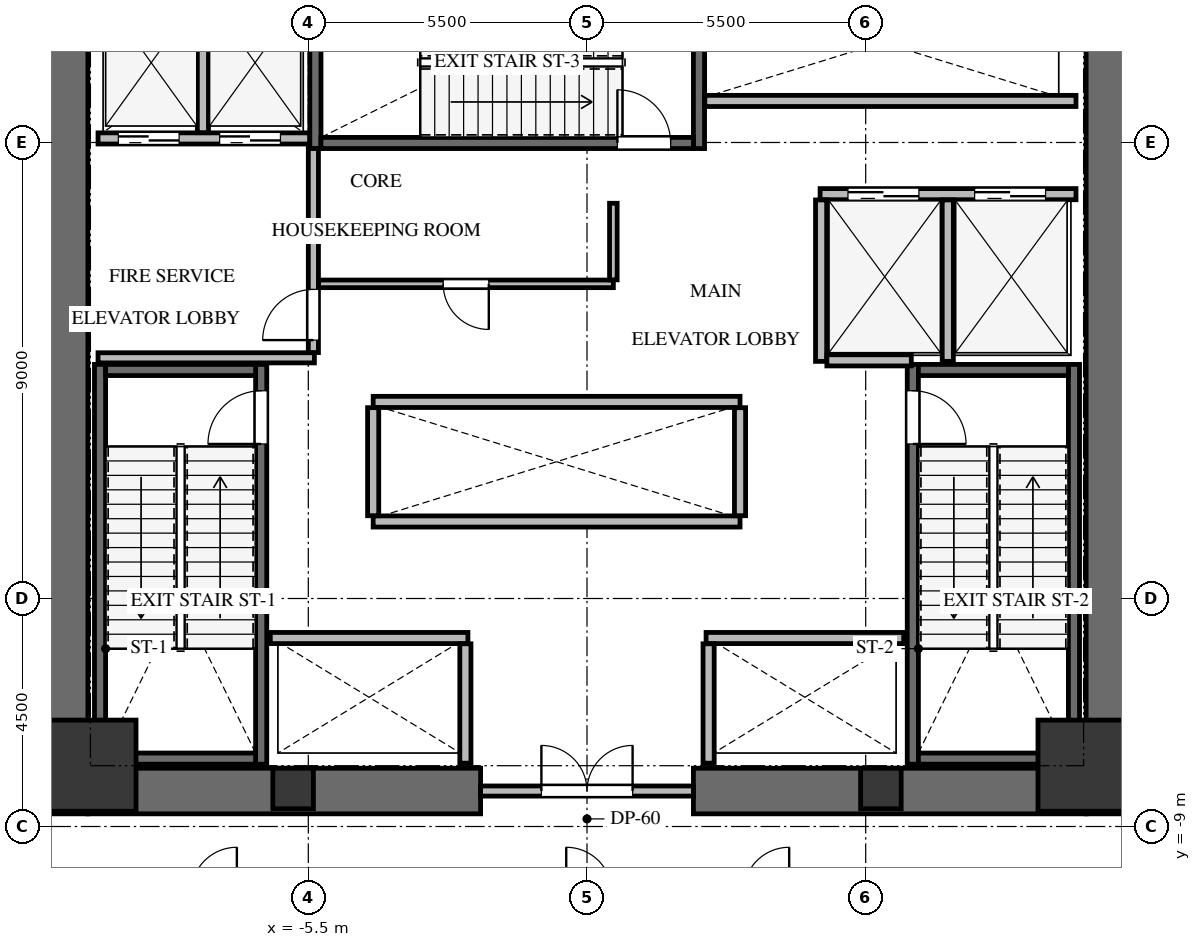
"""IFC4 building model, lengths in metres.
Left out: names, types, materials, properties, quantities, classifications, styles, units other than length and angle.
Written with IfcOpenShell. Run it as: python <this file> out.ifc"""

import sys

from ifc_helpers import new_model, si_unit, direction, frame, frame_2d, origin, origin_2d, place, context, subcontext, project, spatial, rectangle, extrude, source, transform, mapped, element, fill, save


model = new_model("IFC4")
c1 = context("Model", 3, precision=1e-05, world=origin(), true_north=direction((0.0, 1.0)))
c2 = subcontext(c1, "Body", "Model", "MODEL_VIEW")
j1 = project(units=[si_unit("LENGTHUNIT", "METRE"), si_unit("PLANEANGLEUNIT", "RADIAN")], contexts=[c1])
p1 = place(None, origin())
s1 = spatial("IfcSite", under=j1, at=p1, CompositionType="ELEMENT")
p2 = place(p1, origin())
s2 = spatial("IfcBuilding", under=s1, at=p2, CompositionType="ELEMENT")
p3 = place(p2, frame((0.0, 0.0, 10.4)))
s3 = spatial("IfcBuildingStorey", under=s2, at=p3, CompositionType="ELEMENT", Elevation=10.4)
for number, where, z_axis, x_axis in (
    (1, (-10.3, -8.75, 0.0), (0.0, 0.0, 1.0), (0.0, 1.0, 0.0)),
    (2, (10.3, -8.75, 0.0), (0.0, 0.0, 1.0), (0.0, 1.0, 0.0)),
):
    element("IfcWall", number, at=place(p3, frame(where, z_axis=z_axis, x_axis=x_axis)), inside=s3, PredefinedType="SHEAR", context=c2, shape_type="SweptSolid", body=[
        extrude(rectangle(XDim=17.5, YDim=0.9, at=frame_2d((8.75, 0.0))), origin(), (0.0, 0.0, 1.0), 5.2),
    ])
for number, where, z_axis, x_axis in (
    (3, (-9.85, -8.3, 0.0), (0.0, 0.0, 1.0), (1.0, 0.0, 0.0)),
    (4, (2.1, -8.3, 0.0), (0.0, 0.0, 1.0), (1.0, 0.0, 0.0)),
):
    element("IfcWall", number, at=place(p3, frame(where, z_axis=z_axis, x_axis=x_axis)), inside=s3, PredefinedType="SHEAR", context=c2, shape_type="SweptSolid", body=[
        extrude(rectangle(XDim=7.75, YDim=0.9, at=frame_2d((3.875, 0.0))), origin(), (0.0, 0.0, 1.0), 5.2),
    ])
p4 = place(p3, frame((-6.43, -7.77, -0.35), z_axis=(0.0, 0.0, 1.0), x_axis=(0.0, 1.0, 0.0)))
e5 = element("IfcWall", 5, at=p4, inside=s3, PredefinedType="SHEAR", context=c2, shape_type="SweptSolid", body=[
    extrude(rectangle(XDim=7.89, YDim=0.22, at=frame_2d((3.945, 0.0))), origin(), (0.0, 0.0, 1.0), 5.23),
])
p5 = place(p4, frame((6.32, 0.0, 0.0)))
e6 = element("IfcOpeningElement", 6, at=p5, cuts=e5, PredefinedType="OPENING", context=c2, shape_type="SweptSolid", body=[
    extrude(rectangle(XDim=1.05, YDim=2.15, at=frame_2d((0.525, 1.075))), frame((0.0, 0.12, 0.0), z_axis=(0.0, -1.0, 0.0), x_axis=(1.0, 0.0, 0.0)), (0.0, 0.0, 1.0), 0.24),
])
p6 = place(p3, frame((-9.61, 0.12, -0.35), z_axis=(0.0, 0.0, 1.0), x_axis=(0.0, -1.0, 0.0)))
e7 = element("IfcWall", 7, at=p6, inside=s3, PredefinedType="SHEAR", context=c2, shape_type="SweptSolid", body=[
    extrude(rectangle(XDim=7.89, YDim=0.22, at=frame_2d((3.945, 0.0))), origin(), (0.0, 0.0, 1.0), 5.23),
])
for number, where, z_axis, x_axis in (
    (8, (-9.5, -7.66, -0.35), (0.0, 0.0, 1.0), (1.0, 0.0, 0.0)),
    (9, (-6.54, 0.01, -0.35), (0.0, 0.0, 1.0), (-1.0, 0.0, 0.0)),
):
    element("IfcWall", number, at=place(p3, frame(where, z_axis=z_axis, x_axis=x_axis)), inside=s3, PredefinedType="SHEAR", context=c2, shape_type="SweptSolid", body=[
        extrude(rectangle(XDim=2.96, YDim=0.22, at=frame_2d((1.48, 0.0))), origin(), (0.0, 0.0, 1.0), 5.23),
    ])
p7 = place(p3, frame((9.61, -7.77, -0.35), z_axis=(0.0, 0.0, 1.0), x_axis=(0.0, 1.0, 0.0)))
e10 = element("IfcWall", 10, at=p7, inside=s3, PredefinedType="SHEAR", context=c2, shape_type="SweptSolid", body=[
    extrude(rectangle(XDim=7.89, YDim=0.22, at=frame_2d((3.945, 0.0))), origin(), (0.0, 0.0, 1.0), 5.23),
])
p8 = place(p3, frame((6.43, 0.12, -0.35), z_axis=(0.0, 0.0, 1.0), x_axis=(0.0, -1.0, 0.0)))
e11 = element("IfcWall", 11, at=p8, inside=s3, PredefinedType="SHEAR", context=c2, shape_type="SweptSolid", body=[
    extrude(rectangle(XDim=7.89, YDim=0.22, at=frame_2d((3.945, 0.0))), origin(), (0.0, 0.0, 1.0), 5.23),
])
p9 = place(p8, frame((0.52, 0.0, 0.0)))
e12 = element("IfcOpeningElement", 12, at=p9, cuts=e11, PredefinedType="OPENING", context=c2, shape_type="SweptSolid", body=[
    extrude(rectangle(XDim=1.05, YDim=2.15, at=frame_2d((0.525, 1.075))), frame((0.0, 0.12, 0.0), z_axis=(0.0, -1.0, 0.0), x_axis=(1.0, 0.0, 0.0)), (0.0, 0.0, 1.0), 0.24),
])
for number, where, z_axis, x_axis in (
    (13, (6.54, -7.66, -0.35), (0.0, 0.0, 1.0), (1.0, 0.0, 0.0)),
    (14, (9.5, 0.01, -0.35), (0.0, 0.0, 1.0), (-1.0, 0.0, 0.0)),
):
    element("IfcWall", number, at=place(p3, frame(where, z_axis=z_axis, x_axis=x_axis)), inside=s3, PredefinedType="SHEAR", context=c2, shape_type="SweptSolid", body=[
        extrude(rectangle(XDim=2.96, YDim=0.22, at=frame_2d((1.48, 0.0))), origin(), (0.0, 0.0, 1.0), 5.23),
    ])
for number, where, z_axis, x_axis in (
    (15, (2.21, 4.38, -0.35), (0.0, 0.0, 1.0), (0.0, 1.0, 0.0)),
    (16, (-5.36, 7.78, -0.35), (0.0, 0.0, 1.0), (0.0, -1.0, 0.0)),
):
    element("IfcWall", number, at=place(p3, frame(where, z_axis=z_axis, x_axis=x_axis)), inside=s3, PredefinedType="SHEAR", context=c2, shape_type="SweptSolid", body=[
        extrude(rectangle(XDim=3.4, YDim=0.22, at=frame_2d((1.7, 0.0))), origin(), (0.0, 0.0, 1.0), 5.23),
    ])
p10 = place(p3, frame((-5.25, 4.49, -0.35), z_axis=(0.0, 0.0, 1.0), x_axis=(1.0, 0.0, 0.0)))
e17 = element("IfcWall", 17, at=p10, inside=s3, PredefinedType="SHEAR", context=c2, shape_type="SweptSolid", body=[
    extrude(rectangle(XDim=7.35, YDim=0.22, at=frame_2d((3.675, 0.0))), origin(), (0.0, 0.0, 1.0), 5.23),
])
p11 = place(p10, frame((5.85, 0.0, 0.0)))
e18 = element("IfcOpeningElement", 18, at=p11, cuts=e17, PredefinedType="OPENING", context=c2, shape_type="SweptSolid", body=[
    extrude(rectangle(XDim=1.05, YDim=2.15, at=frame_2d((0.525, 1.075))), frame((0.0, 0.12, 0.0), z_axis=(0.0, -1.0, 0.0), x_axis=(1.0, 0.0, 0.0)), (0.0, 0.0, 1.0), 0.24),
])
m1 = source(origin(), c2, "Body", "SweptSolid", [
    extrude(rectangle(XDim=1.8, YDim=1.8, at=origin_2d()), origin(), (0.0, 0.0, 1.0), 5.23),
])
for number, where, z_axis, x_axis in (
    (19, (-9.8, -7.8, -0.35), (0.0, 0.0, 1.0), (1.0, 0.0, 0.0)),
    (20, (9.8, -7.8, -0.35), (0.0, 0.0, 1.0), (1.0, 0.0, 0.0)),
):
    element("IfcColumn", number, at=place(p3, frame(where, z_axis=z_axis, x_axis=x_axis)), inside=s3, PredefinedType="COLUMN", context=c2, shape_type="MappedRepresentation", body=[
        mapped(m1, transform((0.0, 0.0, 0.0), x_axis=(1.0, 0.0, 0.0), y_axis=(0.0, 1.0, 0.0), z_axis=(0.0, 0.0, 1.0), scale=1.0)),
    ])
m2 = source(origin(), c2, "Body", "SweptSolid", [
    extrude(rectangle(XDim=0.8, YDim=0.8, at=origin_2d()), origin(), (0.0, 0.0, 1.0), 5.23),
])
for number, where, z_axis, x_axis in (
    (21, (-5.8, -8.25, -0.35), (0.0, 0.0, 1.0), (1.0, 0.0, 0.0)),
    (22, (5.8, -8.25, -0.35), (0.0, 0.0, 1.0), (1.0, 0.0, 0.0)),
):
    element("IfcColumn", number, at=place(p3, frame(where, z_axis=z_axis, x_axis=x_axis)), inside=s3, PredefinedType="PILASTER", context=c2, shape_type="MappedRepresentation", body=[
        mapped(m2, transform((0.0, 0.0, 0.0), x_axis=(1.0, 0.0, 0.0), y_axis=(0.0, 1.0, 0.0), z_axis=(0.0, 0.0, 1.0), scale=1.0)),
    ])
p12 = place(p3, frame((-2.1, -8.3, 0.0), z_axis=(0.0, 0.0, 1.0), x_axis=(1.0, 0.0, 0.0)))
e23 = element("IfcWall", 23, at=p12, inside=s3, PredefinedType="SOLIDWALL", context=c2, shape_type="SweptSolid", body=[
    extrude(rectangle(XDim=4.2, YDim=0.2, at=frame_2d((2.1, 0.0))), origin(), (0.0, 0.0, 1.0), 4.865),
])
p13 = place(p12, frame((1.2, 0.0, 0.0)))
e24 = element("IfcOpeningElement", 24, at=p13, cuts=e23, PredefinedType="OPENING", context=c2, shape_type="SweptSolid", body=[
    extrude(rectangle(XDim=1.8, YDim=2.15, at=frame_2d((0.9, 1.075))), frame((0.0, 0.11, 0.0), z_axis=(0.0, -1.0, 0.0), x_axis=(1.0, 0.0, 0.0)), (0.0, 0.0, 1.0), 0.22),
])
p14 = place(p3, frame((-9.65, 4.58, 0.0), z_axis=(0.0, 0.0, 1.0), x_axis=(1.0, 0.0, 0.0)))
e25 = element("IfcWall", 25, at=p14, inside=s3, PredefinedType="SOLIDWALL", context=c2, shape_type="SweptSolid", body=[
    extrude(rectangle(XDim=4.175, YDim=0.22, at=frame_2d((2.087, 0.0))), origin(), (0.0, 0.0, 1.0), 4.865),
])
p15 = place(p14, frame((0.4, 0.0, 0.0)))
e26 = element("IfcOpeningElement", 26, at=p15, cuts=e25, PredefinedType="OPENING", context=c2, shape_type="SweptSolid", body=[
    extrude(rectangle(XDim=1.2, YDim=2.15, at=frame_2d((0.6, 1.075))), frame((0.0, 0.12, 0.0), z_axis=(0.0, -1.0, 0.0), x_axis=(1.0, 0.0, 0.0)), (0.0, 0.0, 1.0), 0.24),
])
p16 = place(p14, frame((2.4, 0.0, 0.0)))
e27 = element("IfcOpeningElement", 27, at=p16, cuts=e25, PredefinedType="OPENING", context=c2, shape_type="SweptSolid", body=[
    extrude(rectangle(XDim=1.2, YDim=2.15, at=frame_2d((0.6, 1.075))), frame((0.0, 0.12, 0.0), z_axis=(0.0, -1.0, 0.0), x_axis=(1.0, 0.0, 0.0)), (0.0, 0.0, 1.0), 0.24),
])
p17 = place(p3, frame((-7.58, 4.694, 0.0), z_axis=(0.0, 0.0, 1.0), x_axis=(0.0, 1.0, 0.0)))
e28 = element("IfcWall", 28, at=p17, inside=s3, PredefinedType="SOLIDWALL", context=c2, shape_type="SweptSolid", body=[
    extrude(rectangle(XDim=2.906, YDim=0.22, at=frame_2d((1.453, 0.0))), origin(), (0.0, 0.0, 1.0), 4.865),
])
p18 = place(p3, frame((-9.65, 0.25, 0.0), z_axis=(0.0, 0.0, 1.0), x_axis=(1.0, 0.0, 0.0)))
e29 = element("IfcWall", 29, at=p18, inside=s3, PredefinedType="SOLIDWALL", context=c2, shape_type="SweptSolid", body=[
    extrude(rectangle(XDim=4.27, YDim=0.2, at=frame_2d((2.135, 0.0))), origin(), (0.0, 0.0, 1.0), 4.865),
])
p19 = place(p3, frame((-5.4, 0.354, 0.0), z_axis=(0.0, 0.0, 1.0), x_axis=(0.0, 1.0, 0.0)))
e30 = element("IfcWall", 30, at=p19, inside=s3, PredefinedType="SOLIDWALL", context=c2, shape_type="SweptSolid", body=[
    extrude(rectangle(XDim=4.026, YDim=0.2, at=frame_2d((2.013, 0.0))), origin(), (0.0, 0.0, 1.0), 4.865),
])
p20 = place(p19, frame((0.246, 0.0, 0.0)))
e31 = element("IfcOpeningElement", 31, at=p20, cuts=e30, PredefinedType="OPENING", context=c2, shape_type="SweptSolid", body=[
    extrude(rectangle(XDim=1.0, YDim=2.15, at=frame_2d((0.5, 1.075))), frame((0.0, 0.11, 0.0), z_axis=(0.0, -1.0, 0.0), x_axis=(1.0, 0.0, 0.0)), (0.0, 0.0, 1.0), 0.22),
])
p21 = place(p3, frame((4.6, 3.48, 0.0), z_axis=(0.0, 0.0, 1.0), x_axis=(1.0, 0.0, 0.0)))
e32 = element("IfcWall", 32, at=p21, inside=s3, PredefinedType="SOLIDWALL", context=c2, shape_type="SweptSolid", body=[
    extrude(rectangle(XDim=5.05, YDim=0.22, at=frame_2d((2.525, 0.0))), origin(), (0.0, 0.0, 1.0), 4.865),
])
p22 = place(p21, frame((0.55, 0.0, 0.0)))
e33 = element("IfcOpeningElement", 33, at=p22, cuts=e32, PredefinedType="OPENING", context=c2, shape_type="SweptSolid", body=[
    extrude(rectangle(XDim=1.4, YDim=2.15, at=frame_2d((0.7, 1.075))), frame((0.0, 0.12, 0.0), z_axis=(0.0, -1.0, 0.0), x_axis=(1.0, 0.0, 0.0)), (0.0, 0.0, 1.0), 0.24),
])
p23 = place(p21, frame((3.05, 0.0, 0.0)))
e34 = element("IfcOpeningElement", 34, at=p23, cuts=e32, PredefinedType="OPENING", context=c2, shape_type="SweptSolid", body=[
    extrude(rectangle(XDim=1.4, YDim=2.15, at=frame_2d((0.7, 1.075))), frame((0.0, 0.12, 0.0), z_axis=(0.0, -1.0, 0.0), x_axis=(1.0, 0.0, 0.0)), (0.0, 0.0, 1.0), 0.24),
])
for number, where, z_axis, x_axis in (
    (35, (4.62, 0.18, 0.0), (0.0, 0.0, 1.0), (0.0, 1.0, 0.0)),
    (36, (7.12, 0.18, 0.0), (0.0, 0.0, 1.0), (0.0, 1.0, 0.0)),
):
    element("IfcWall", number, at=place(p3, frame(where, z_axis=z_axis, x_axis=x_axis)), inside=s3, PredefinedType="SOLIDWALL", context=c2, shape_type="SweptSolid", body=[
        extrude(rectangle(XDim=3.186, YDim=0.22, at=frame_2d((1.593, 0.0))), origin(), (0.0, 0.0, 1.0), 4.865),
    ])
p24 = place(p3, frame((4.734, 0.2, 0.0), z_axis=(0.0, 0.0, 1.0), x_axis=(1.0, 0.0, 0.0)))
e37 = element("IfcWall", 37, at=p24, inside=s3, PredefinedType="SOLIDWALL", context=c2, shape_type="SweptSolid", body=[
    extrude(rectangle(XDim=1.666, YDim=0.22, at=frame_2d((0.833, 0.0))), origin(), (0.0, 0.0, 1.0), 4.865),
])
for number, where, z_axis, x_axis in (
    (38, (-6.25, -5.28, 0.0), (0.0, 0.0, 1.0), (1.0, 0.0, 0.0)),
    (39, (2.35, -5.28, 0.0), (0.0, 0.0, 1.0), (1.0, 0.0, 0.0)),
):
    element("IfcWall", number, at=place(p3, frame(where, z_axis=z_axis, x_axis=x_axis)), inside=s3, PredefinedType="SOLIDWALL", context=c2, shape_type="SweptSolid", body=[
        extrude(rectangle(XDim=3.9, YDim=0.22, at=frame_2d((1.95, 0.0))), origin(), (0.0, 0.0, 1.0), 4.865),
    ])
for number, where, z_axis, x_axis in (
    (40, (-2.4, -7.75, 0.0), (0.0, 0.0, 1.0), (0.0, 1.0, 0.0)),
    (41, (2.4, -7.75, 0.0), (0.0, 0.0, 1.0), (0.0, 1.0, 0.0)),
):
    element("IfcWall", number, at=place(p3, frame(where, z_axis=z_axis, x_axis=x_axis)), inside=s3, PredefinedType="SOLIDWALL", context=c2, shape_type="SweptSolid", body=[
        extrude(rectangle(XDim=2.356, YDim=0.22, at=frame_2d((1.178, 0.0))), origin(), (0.0, 0.0, 1.0), 4.865),
    ])
for number, where, z_axis, x_axis in (
    (42, (-4.22, -2.98, 0.0), (0.0, 0.0, 1.0), (1.0, 0.0, 0.0)),
    (43, (-4.22, -0.62, 0.0), (0.0, 0.0, 1.0), (1.0, 0.0, 0.0)),
):
    element("IfcWall", number, at=place(p3, frame(where, z_axis=z_axis, x_axis=x_axis)), inside=s3, PredefinedType="SOLIDWALL", context=c2, shape_type="SweptSolid", body=[
        extrude(rectangle(XDim=7.24, YDim=0.22, at=frame_2d((3.62, 0.0))), origin(), (0.0, 0.0, 1.0), 4.865),
    ])
for number, where, z_axis, x_axis in (
    (44, (-4.22, -2.866, 0.0), (0.0, 0.0, 1.0), (0.0, 1.0, 0.0)),
    (45, (3.02, -2.866, 0.0), (0.0, 0.0, 1.0), (0.0, 1.0, 0.0)),
):
    element("IfcWall", number, at=place(p3, frame(where, z_axis=z_axis, x_axis=x_axis)), inside=s3, PredefinedType="SOLIDWALL", context=c2, shape_type="SweptSolid", body=[
        extrude(rectangle(XDim=2.132, YDim=0.22, at=frame_2d((1.066, 0.0))), origin(), (0.0, 0.0, 1.0), 4.865),
    ])
p25 = place(p3, frame((2.325, 5.32, 0.0), z_axis=(0.0, 0.0, 1.0), x_axis=(1.0, 0.0, 0.0)))
e46 = element("IfcWall", 46, at=p25, inside=s3, PredefinedType="SOLIDWALL", context=c2, shape_type="SweptSolid", body=[
    extrude(rectangle(XDim=7.325, YDim=0.22, at=frame_2d((3.663, 0.0))), origin(), (0.0, 0.0, 1.0), 4.865),
])
p26 = place(p3, frame((0.52, 1.71, 0.0), z_axis=(0.0, 0.0, 1.0), x_axis=(-1.0, 0.0, 0.0)))
e47 = element("IfcWall", 47, at=p26, inside=s3, PredefinedType="PARTITIONING", context=c2, shape_type="SweptSolid", body=[
    extrude(rectangle(XDim=5.816, YDim=0.15, at=frame_2d((2.908, 0.0))), origin(), (0.0, 0.0, 1.0), 4.865),
])
p27 = place(p26, frame((2.458, 0.0, 0.0)))
e48 = element("IfcOpeningElement", 48, at=p27, cuts=e47, PredefinedType="OPENING", context=c2, shape_type="SweptSolid", body=[
    extrude(rectangle(XDim=0.9, YDim=2.05, at=frame_2d((0.45, 1.025))), frame((0.0, 0.085, 0.0), z_axis=(0.0, -1.0, 0.0), x_axis=(1.0, 0.0, 0.0)), (0.0, 0.0, 1.0), 0.17),
])
p28 = place(p3, frame((0.52, 3.3, 0.0), z_axis=(0.0, 0.0, 1.0), x_axis=(0.0, -1.0, 0.0)))
e49 = element("IfcWall", 49, at=p28, inside=s3, PredefinedType="PARTITIONING", context=c2, shape_type="SweptSolid", body=[
    extrude(rectangle(XDim=1.511, YDim=0.15, at=frame_2d((0.755, 0.0))), origin(), (0.0, 0.0, 1.0), 4.865),
])
m3 = source(origin(), c2, "Body", "SweptSolid", [
    extrude(rectangle(XDim=1.05, YDim=2.15, at=frame_2d((0.525, 1.075))), frame((0.0, 0.025, 0.0), z_axis=(0.0, -1.0, 0.0), x_axis=(1.0, 0.0, 0.0)), (0.0, 0.0, 1.0), 0.05),
])
p29 = place(p5, origin())
e50 = element("IfcDoor", 50, at=p29, inside=s3, OperationType="SINGLE_SWING_LEFT", PredefinedType="DOOR", context=c2, shape_type="MappedRepresentation", body=[
    mapped(m3, transform((0.0, 0.0, 0.0), x_axis=(1.0, 0.0, 0.0), y_axis=(0.0, 1.0, 0.0), z_axis=(0.0, 0.0, 1.0), scale=1.0)),
])
fill(e6, e50)
m4 = source(origin(), c2, "Body", "SweptSolid", [
    extrude(rectangle(XDim=1.05, YDim=2.15, at=frame_2d((0.525, 1.075))), frame((0.0, 0.025, 0.0), z_axis=(0.0, -1.0, 0.0), x_axis=(1.0, 0.0, 0.0)), (0.0, 0.0, 1.0), 0.05),
])
p30 = place(p9, origin())
e51 = element("IfcDoor", 51, at=p30, inside=s3, OperationType="SINGLE_SWING_RIGHT", PredefinedType="DOOR", context=c2, shape_type="MappedRepresentation", body=[
    mapped(m4, transform((0.0, 0.0, 0.0), x_axis=(1.0, 0.0, 0.0), y_axis=(0.0, 1.0, 0.0), z_axis=(0.0, 0.0, 1.0), scale=1.0)),
])
fill(e12, e51)
p31 = place(p11, origin())
e52 = element("IfcDoor", 52, at=p31, inside=s3, OperationType="SINGLE_SWING_LEFT", PredefinedType="DOOR", context=c2, shape_type="MappedRepresentation", body=[
    mapped(m3, transform((0.0, 0.0, 0.0), x_axis=(1.0, 0.0, 0.0), y_axis=(0.0, 1.0, 0.0), z_axis=(0.0, 0.0, 1.0), scale=1.0)),
])
fill(e18, e52)
m5 = source(origin(), c2, "Body", "SweptSolid", [
    extrude(rectangle(XDim=1.8, YDim=2.15, at=frame_2d((0.9, 1.075))), frame((0.0, 0.025, 0.0), z_axis=(0.0, -1.0, 0.0), x_axis=(1.0, 0.0, 0.0)), (0.0, 0.0, 1.0), 0.05),
])
p32 = place(p13, origin())
e53 = element("IfcDoor", 53, at=p32, inside=s3, OperationType="DOUBLE_DOOR_SINGLE_SWING", PredefinedType="DOOR", context=c2, shape_type="MappedRepresentation", body=[
    mapped(m5, transform((0.0, 0.0, 0.0), x_axis=(1.0, 0.0, 0.0), y_axis=(0.0, 1.0, 0.0), z_axis=(0.0, 0.0, 1.0), scale=1.0)),
])
fill(e24, e53)
m6 = source(origin(), c2, "Body", "SweptSolid", [
    extrude(rectangle(XDim=1.2, YDim=2.15, at=frame_2d((0.6, 1.075))), frame((0.0, 0.025, 0.0), z_axis=(0.0, -1.0, 0.0), x_axis=(1.0, 0.0, 0.0)), (0.0, 0.0, 1.0), 0.05),
])
p33 = place(p15, origin())
e54 = element("IfcDoor", 54, at=p33, inside=s3, OperationType="DOUBLE_DOOR_SLIDING", PredefinedType="DOOR", context=c2, shape_type="MappedRepresentation", body=[
    mapped(m6, transform((0.0, 0.0, 0.0), x_axis=(1.0, 0.0, 0.0), y_axis=(0.0, 1.0, 0.0), z_axis=(0.0, 0.0, 1.0), scale=1.0)),
])
fill(e26, e54)
p34 = place(p16, origin())
e55 = element("IfcDoor", 55, at=p34, inside=s3, OperationType="DOUBLE_DOOR_SLIDING", PredefinedType="DOOR", context=c2, shape_type="MappedRepresentation", body=[
    mapped(m6, transform((0.0, 0.0, 0.0), x_axis=(1.0, 0.0, 0.0), y_axis=(0.0, 1.0, 0.0), z_axis=(0.0, 0.0, 1.0), scale=1.0)),
])
fill(e27, e55)
m7 = source(origin(), c2, "Body", "SweptSolid", [
    extrude(rectangle(XDim=1.0, YDim=2.15, at=frame_2d((0.5, 1.075))), frame((0.0, 0.025, 0.0), z_axis=(0.0, -1.0, 0.0), x_axis=(1.0, 0.0, 0.0)), (0.0, 0.0, 1.0), 0.05),
])
p35 = place(p20, origin())
e56 = element("IfcDoor", 56, at=p35, inside=s3, OperationType="SINGLE_SWING_LEFT", PredefinedType="DOOR", context=c2, shape_type="MappedRepresentation", body=[
    mapped(m7, transform((0.0, 0.0, 0.0), x_axis=(1.0, 0.0, 0.0), y_axis=(0.0, 1.0, 0.0), z_axis=(0.0, 0.0, 1.0), scale=1.0)),
])
fill(e31, e56)
m8 = source(origin(), c2, "Body", "SweptSolid", [
    extrude(rectangle(XDim=1.4, YDim=2.15, at=frame_2d((0.7, 1.075))), frame((0.0, 0.025, 0.0), z_axis=(0.0, -1.0, 0.0), x_axis=(1.0, 0.0, 0.0)), (0.0, 0.0, 1.0), 0.05),
])
p36 = place(p22, origin())
e57 = element("IfcDoor", 57, at=p36, inside=s3, OperationType="DOUBLE_DOOR_SLIDING", PredefinedType="DOOR", context=c2, shape_type="MappedRepresentation", body=[
    mapped(m8, transform((0.0, 0.0, 0.0), x_axis=(1.0, 0.0, 0.0), y_axis=(0.0, 1.0, 0.0), z_axis=(0.0, 0.0, 1.0), scale=1.0)),
])
fill(e33, e57)
p37 = place(p23, origin())
e58 = element("IfcDoor", 58, at=p37, inside=s3, OperationType="DOUBLE_DOOR_SLIDING", PredefinedType="DOOR", context=c2, shape_type="MappedRepresentation", body=[
    mapped(m8, transform((0.0, 0.0, 0.0), x_axis=(1.0, 0.0, 0.0), y_axis=(0.0, 1.0, 0.0), z_axis=(0.0, 0.0, 1.0), scale=1.0)),
])
fill(e34, e58)
m9 = source(origin(), c2, "Body", "SweptSolid", [
    extrude(rectangle(XDim=0.9, YDim=2.05, at=frame_2d((0.45, 1.025))), frame((0.0, 0.025, 0.0), z_axis=(0.0, -1.0, 0.0), x_axis=(1.0, 0.0, 0.0)), (0.0, 0.0, 1.0), 0.05),
])
p38 = place(p27, origin())
e59 = element("IfcDoor", 59, at=p38, inside=s3, OperationType="SINGLE_SWING_LEFT", PredefinedType="DOOR", context=c2, shape_type="MappedRepresentation", body=[
    mapped(m9, transform((0.0, 0.0, 0.0), x_axis=(1.0, 0.0, 0.0), y_axis=(0.0, 1.0, 0.0), z_axis=(0.0, 0.0, 1.0), scale=1.0)),
])
fill(e48, e59)
save(model, sys.argv[1])
